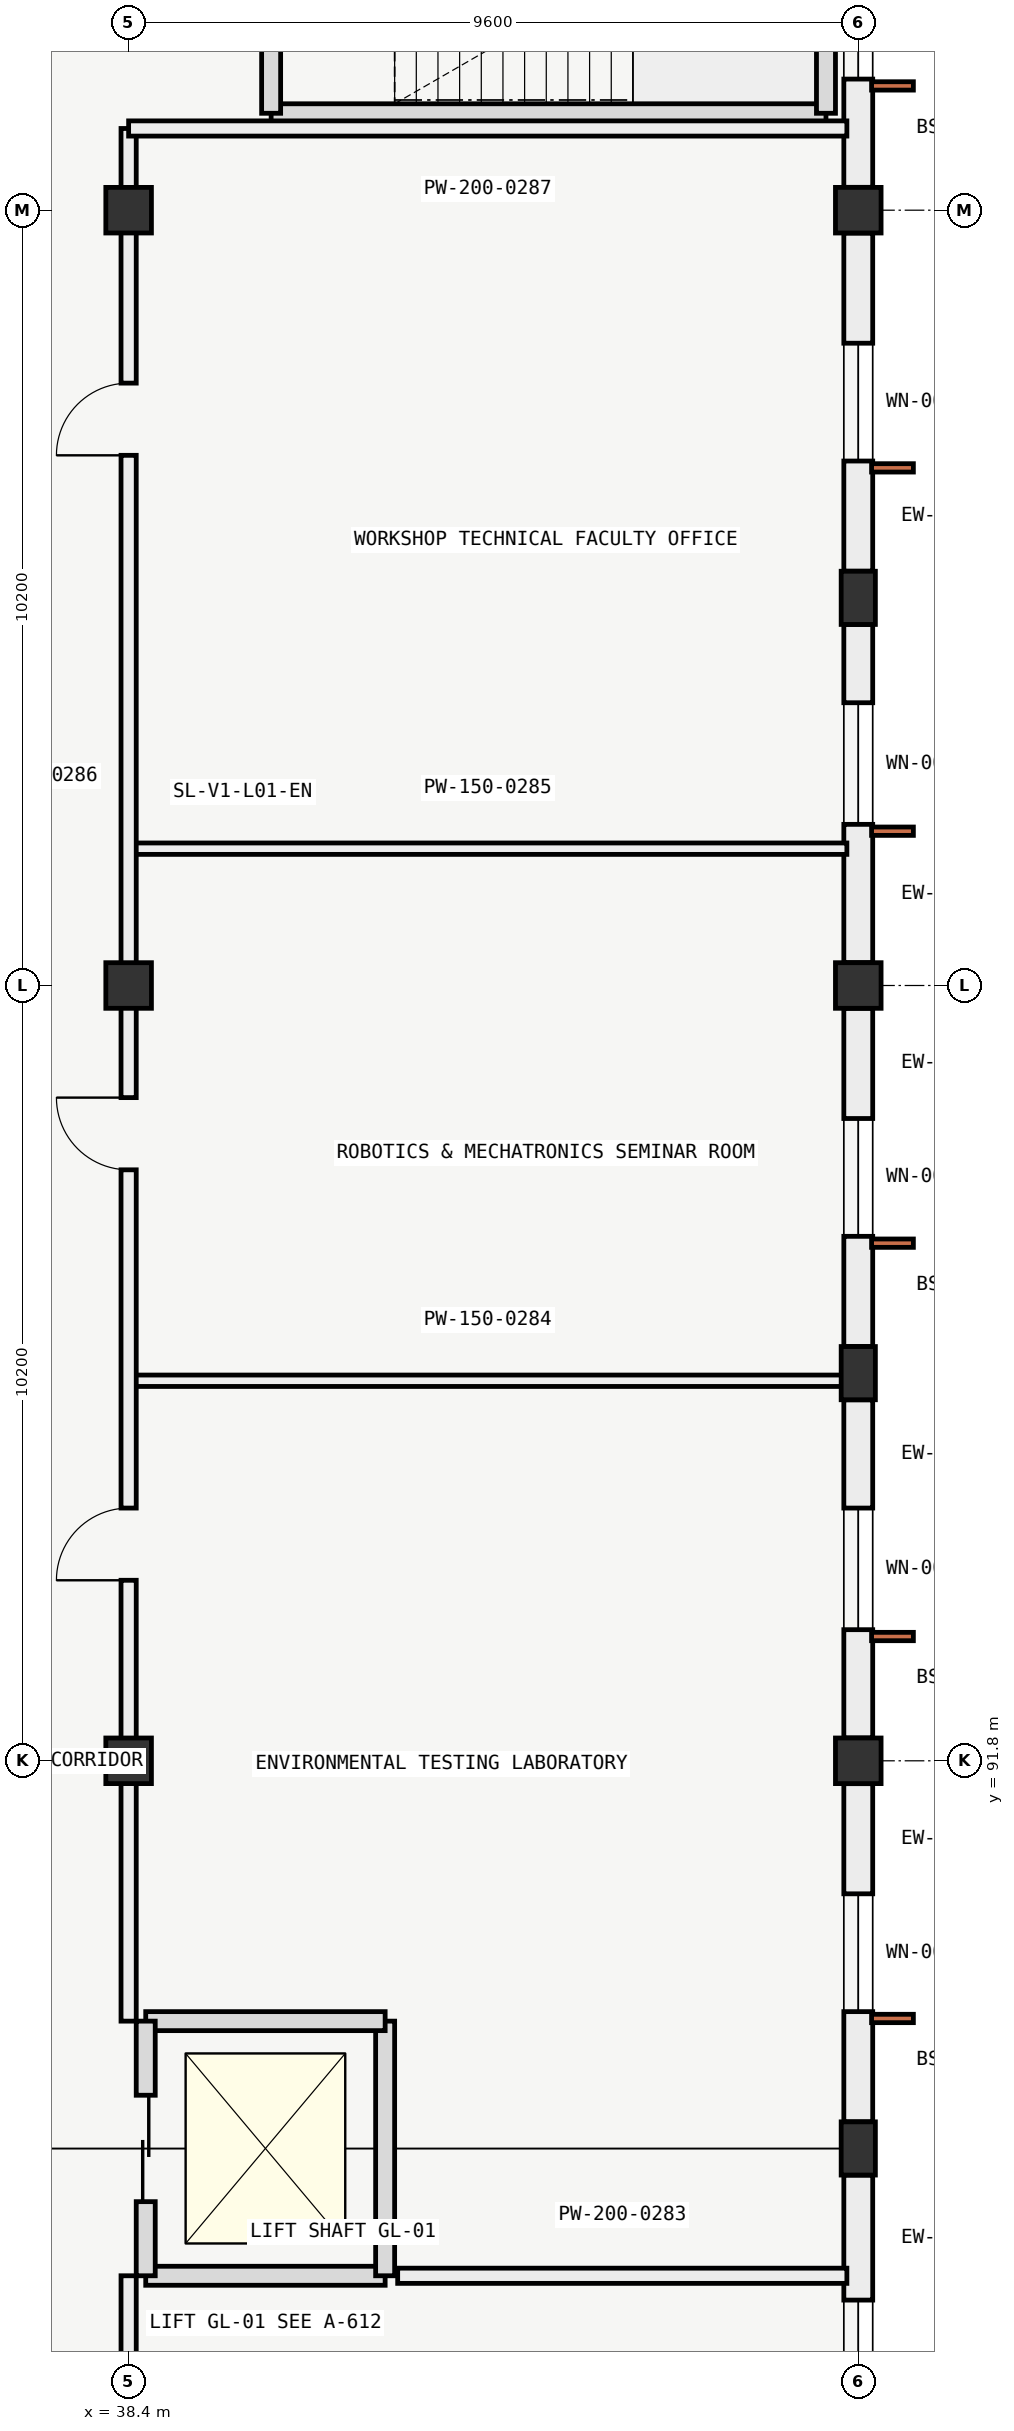
"""IFC4 building model, lengths in metres.
Left out: names, types, materials, properties, quantities, classifications, styles, units other than length and angle.
Written with IfcOpenShell. Run it as: python <this file> out.ifc"""

import sys

from ifc_helpers import new_model, si_unit, direction, frame, frame_2d, origin, origin_2d, place, context, subcontext, project, spatial, rectangle, extrude, element, fill, save


model = new_model("IFC4")
c1 = context("Model", 3, precision=1e-05, world=origin(), true_north=direction((0.0, 1.0)))
c2 = subcontext(c1, "Body", "Model", "MODEL_VIEW")
j1 = project(units=[si_unit("LENGTHUNIT", "METRE"), si_unit("PLANEANGLEUNIT", "RADIAN")], contexts=[c1])
p1 = place(None, origin())
s1 = spatial("IfcSite", under=j1, at=p1, CompositionType="ELEMENT")
p2 = place(p1, origin())
s2 = spatial("IfcBuilding", under=s1, at=p2, CompositionType="ELEMENT")
p3 = place(p2, frame((0.0, 0.0, 5.4)))
s3 = spatial("IfcBuildingStorey", under=s2, at=p3, CompositionType="ELEMENT", Elevation=5.4)
for number, where, z_axis, x_axis in (
    (1, (38.4, 91.8, 0.0), (0.0, 0.0, 1.0), (1.0, 0.0, 0.0)),
    (2, (48.0, 91.8, 0.0), (0.0, 0.0, 1.0), (1.0, 0.0, 0.0)),
    (3, (38.4, 102.0, 0.0), (0.0, 0.0, 1.0), (1.0, 0.0, 0.0)),
    (4, (48.0, 102.0, 0.0), (0.0, 0.0, 1.0), (1.0, 0.0, 0.0)),
    (5, (38.4, 112.2, 0.0), (0.0, 0.0, 1.0), (1.0, 0.0, 0.0)),
    (6, (48.0, 112.2, 0.0), (0.0, 0.0, 1.0), (1.0, 0.0, 0.0)),
):
    element("IfcColumn", number, at=place(p3, frame(where, z_axis=z_axis, x_axis=x_axis)), inside=s3, PredefinedType="COLUMN", context=c2, shape_type="SweptSolid", body=[
        extrude(rectangle(XDim=0.6, YDim=0.6, at=origin_2d()), origin(), (0.0, 0.0, 1.0), 4.2),
    ])
for number, where, z_axis, x_axis in (
    (7, (48.0, 86.7, 0.0), (0.0, 0.0, 1.0), (1.0, 0.0, 0.0)),
    (8, (48.0, 96.9, 0.0), (0.0, 0.0, 1.0), (1.0, 0.0, 0.0)),
    (9, (48.0, 107.1, 0.0), (0.0, 0.0, 1.0), (1.0, 0.0, 0.0)),
):
    element("IfcColumn", number, at=place(p3, frame(where, z_axis=z_axis, x_axis=x_axis)), inside=s3, PredefinedType="PILASTER", context=c2, shape_type="SweptSolid", body=[
        extrude(rectangle(XDim=0.45, YDim=0.7, at=origin_2d()), origin(), (0.0, 0.0, 1.0), 4.2),
    ])
p4 = place(p3, frame((48.0, 86.349, 0.0), z_axis=(0.0, 0.0, 1.0), x_axis=(0.0, -1.0, 0.0)))
e10 = element("IfcWall", 10, at=p4, inside=s3, PredefinedType="SOLIDWALL", context=c2, shape_type="SweptSolid", body=[
    extrude(rectangle(XDim=4.448, YDim=0.38, at=frame_2d((2.224, 0.0))), origin(), (0.0, 0.0, 1.0), 3.25),
])
p5 = place(p4, frame((1.644, 0.0, 0.95)))
e11 = element("IfcOpeningElement", 11, at=p5, cuts=e10, PredefinedType="OPENING", context=c2, shape_type="SweptSolid", body=[
    extrude(rectangle(XDim=1.6, YDim=1.9, at=frame_2d((0.8, 0.95))), frame((0.0, 0.2, 0.0), z_axis=(0.0, -1.0, 0.0), x_axis=(1.0, 0.0, 0.0)), (0.0, 0.0, 1.0), 0.4),
])
p6 = place(p3, frame((48.0, 91.499, 0.0), z_axis=(0.0, 0.0, 1.0), x_axis=(0.0, -1.0, 0.0)))
e12 = element("IfcWall", 12, at=p6, inside=s3, PredefinedType="SOLIDWALL", context=c2, shape_type="SweptSolid", body=[
    extrude(rectangle(XDim=4.448, YDim=0.38, at=frame_2d((2.224, 0.0))), origin(), (0.0, 0.0, 1.0), 3.25),
])
p7 = place(p6, frame((1.449, 0.0, 0.95)))
e13 = element("IfcOpeningElement", 13, at=p7, cuts=e12, PredefinedType="OPENING", context=c2, shape_type="SweptSolid", body=[
    extrude(rectangle(XDim=1.55, YDim=1.85, at=frame_2d((0.775, 0.925))), frame((0.0, 0.2, 0.0), z_axis=(0.0, -1.0, 0.0), x_axis=(1.0, 0.0, 0.0)), (0.0, 0.0, 1.0), 0.4),
])
p8 = place(p3, frame((48.0, 96.549, 0.0), z_axis=(0.0, 0.0, 1.0), x_axis=(0.0, -1.0, 0.0)))
e14 = element("IfcWall", 14, at=p8, inside=s3, PredefinedType="SOLIDWALL", context=c2, shape_type="SweptSolid", body=[
    extrude(rectangle(XDim=4.448, YDim=0.38, at=frame_2d((2.224, 0.0))), origin(), (0.0, 0.0, 1.0), 3.25),
])
p9 = place(p8, frame((1.424, 0.0, 0.95)))
e15 = element("IfcOpeningElement", 15, at=p9, cuts=e14, PredefinedType="OPENING", context=c2, shape_type="SweptSolid", body=[
    extrude(rectangle(XDim=1.6, YDim=1.9, at=frame_2d((0.8, 0.95))), frame((0.0, 0.2, 0.0), z_axis=(0.0, -1.0, 0.0), x_axis=(1.0, 0.0, 0.0)), (0.0, 0.0, 1.0), 0.4),
])
p10 = place(p3, frame((48.0, 101.699, 0.0), z_axis=(0.0, 0.0, 1.0), x_axis=(0.0, -1.0, 0.0)))
e16 = element("IfcWall", 16, at=p10, inside=s3, PredefinedType="SOLIDWALL", context=c2, shape_type="SweptSolid", body=[
    extrude(rectangle(XDim=4.448, YDim=0.38, at=frame_2d((2.224, 0.0))), origin(), (0.0, 0.0, 1.0), 3.25),
])
p11 = place(p10, frame((1.449, 0.0, 0.95)))
e17 = element("IfcOpeningElement", 17, at=p11, cuts=e16, PredefinedType="OPENING", context=c2, shape_type="SweptSolid", body=[
    extrude(rectangle(XDim=1.55, YDim=1.85, at=frame_2d((0.775, 0.925))), frame((0.0, 0.2, 0.0), z_axis=(0.0, -1.0, 0.0), x_axis=(1.0, 0.0, 0.0)), (0.0, 0.0, 1.0), 0.4),
])
p12 = place(p3, frame((48.0, 106.749, 0.0), z_axis=(0.0, 0.0, 1.0), x_axis=(0.0, -1.0, 0.0)))
e18 = element("IfcWall", 18, at=p12, inside=s3, PredefinedType="SOLIDWALL", context=c2, shape_type="SweptSolid", body=[
    extrude(rectangle(XDim=4.448, YDim=0.38, at=frame_2d((2.224, 0.0))), origin(), (0.0, 0.0, 1.0), 3.25),
])
p13 = place(p12, frame((1.029, 0.0, 0.95)))
e19 = element("IfcOpeningElement", 19, at=p13, cuts=e18, PredefinedType="OPENING", context=c2, shape_type="SweptSolid", body=[
    extrude(rectangle(XDim=1.6, YDim=1.9, at=frame_2d((0.8, 0.95))), frame((0.0, 0.2, 0.0), z_axis=(0.0, -1.0, 0.0), x_axis=(1.0, 0.0, 0.0)), (0.0, 0.0, 1.0), 0.4),
])
p14 = place(p3, frame((48.0, 111.899, 0.0), z_axis=(0.0, 0.0, 1.0), x_axis=(0.0, -1.0, 0.0)))
e20 = element("IfcWall", 20, at=p14, inside=s3, PredefinedType="SOLIDWALL", context=c2, shape_type="SweptSolid", body=[
    extrude(rectangle(XDim=4.448, YDim=0.38, at=frame_2d((2.224, 0.0))), origin(), (0.0, 0.0, 1.0), 3.25),
])
p15 = place(p14, frame((1.449, 0.0, 0.95)))
e21 = element("IfcOpeningElement", 21, at=p15, cuts=e20, PredefinedType="OPENING", context=c2, shape_type="SweptSolid", body=[
    extrude(rectangle(XDim=1.55, YDim=1.85, at=frame_2d((0.775, 0.925))), frame((0.0, 0.2, 0.0), z_axis=(0.0, -1.0, 0.0), x_axis=(1.0, 0.0, 0.0)), (0.0, 0.0, 1.0), 0.4),
])
p16 = place(p3, frame((48.0, 116.949, 0.0), z_axis=(0.0, 0.0, 1.0), x_axis=(0.0, -1.0, 0.0)))
e22 = element("IfcWall", 22, at=p16, inside=s3, PredefinedType="SOLIDWALL", context=c2, shape_type="SweptSolid", body=[
    extrude(rectangle(XDim=4.448, YDim=0.38, at=frame_2d((2.224, 0.0))), origin(), (0.0, 0.0, 1.0), 3.25),
])
p17 = place(p16, frame((1.424, 0.0, 0.95)))
e23 = element("IfcOpeningElement", 23, at=p17, cuts=e22, PredefinedType="OPENING", context=c2, shape_type="SweptSolid", body=[
    extrude(rectangle(XDim=1.6, YDim=1.9, at=frame_2d((0.8, 0.95))), frame((0.0, 0.2, 0.0), z_axis=(0.0, -1.0, 0.0), x_axis=(1.0, 0.0, 0.0)), (0.0, 0.0, 1.0), 0.4),
])
p18 = place(p3, frame((40.275, 113.475, 0.0), z_axis=(0.0, 0.0, 1.0), x_axis=(1.0, 0.0, 0.0)))
e24 = element("IfcWall", 24, at=p18, inside=s3, PredefinedType="SOLIDWALL", context=c2, shape_type="SweptSolid", body=[
    extrude(rectangle(XDim=7.3, YDim=0.25, at=frame_2d((3.65, 0.0))), origin(), (0.0, 0.0, 1.0), 3.92),
])
p19 = place(p3, frame((47.575, 113.475, 0.0), z_axis=(0.0, 0.0, 1.0), x_axis=(0.0, 1.0, 0.0)))
e25 = element("IfcWall", 25, at=p19, inside=s3, PredefinedType="SOLIDWALL", context=c2, shape_type="SweptSolid", body=[
    extrude(rectangle(XDim=3.45, YDim=0.25, at=frame_2d((1.725, 0.0))), origin(), (0.0, 0.0, 1.0), 3.92),
])
p20 = place(p3, frame((40.275, 116.925, 0.0), z_axis=(0.0, 0.0, 1.0), x_axis=(0.0, -1.0, 0.0)))
e26 = element("IfcWall", 26, at=p20, inside=s3, PredefinedType="SOLIDWALL", context=c2, shape_type="SweptSolid", body=[
    extrude(rectangle(XDim=3.45, YDim=0.25, at=frame_2d((1.725, 0.0))), origin(), (0.0, 0.0, 1.0), 3.92),
])
p21 = place(p20, frame((1.175, 0.0, 0.0)))
e27 = element("IfcOpeningElement", 27, at=p21, cuts=e26, PredefinedType="OPENING", context=c2, shape_type="SweptSolid", body=[
    extrude(rectangle(XDim=1.1, YDim=2.2, at=frame_2d((0.55, 1.1))), frame((0.0, 0.135, 0.0), z_axis=(0.0, -1.0, 0.0), x_axis=(1.0, 0.0, 0.0)), (0.0, 0.0, 1.0), 0.27),
])
p22 = place(p3, frame((38.625, 85.025, 0.0), z_axis=(0.0, 0.0, 1.0), x_axis=(1.0, 0.0, 0.0)))
e28 = element("IfcWall", 28, at=p22, inside=s3, PredefinedType="SOLIDWALL", context=c2, shape_type="SweptSolid", body=[
    extrude(rectangle(XDim=3.15, YDim=0.25, at=frame_2d((1.575, 0.0))), origin(), (0.0, 0.0, 1.0), 3.92),
])
p23 = place(p3, frame((41.775, 85.025, 0.0), z_axis=(0.0, 0.0, 1.0), x_axis=(0.0, 1.0, 0.0)))
e29 = element("IfcWall", 29, at=p23, inside=s3, PredefinedType="SOLIDWALL", context=c2, shape_type="SweptSolid", body=[
    extrude(rectangle(XDim=3.35, YDim=0.25, at=frame_2d((1.675, 0.0))), origin(), (0.0, 0.0, 1.0), 3.92),
])
p24 = place(p3, frame((41.775, 88.375, 0.0), z_axis=(0.0, 0.0, 1.0), x_axis=(-1.0, 0.0, 0.0)))
e30 = element("IfcWall", 30, at=p24, inside=s3, PredefinedType="SOLIDWALL", context=c2, shape_type="SweptSolid", body=[
    extrude(rectangle(XDim=3.15, YDim=0.25, at=frame_2d((1.575, 0.0))), origin(), (0.0, 0.0, 1.0), 3.92),
])
p25 = place(p3, frame((38.625, 88.375, 0.0), z_axis=(0.0, 0.0, 1.0), x_axis=(0.0, -1.0, 0.0)))
e31 = element("IfcWall", 31, at=p25, inside=s3, PredefinedType="SOLIDWALL", context=c2, shape_type="SweptSolid", body=[
    extrude(rectangle(XDim=3.35, YDim=0.25, at=frame_2d((1.675, 0.0))), origin(), (0.0, 0.0, 1.0), 3.92),
])
p26 = place(p25, frame((0.975, 0.0, 0.0)))
e32 = element("IfcOpeningElement", 32, at=p26, cuts=e31, PredefinedType="OPENING", context=c2, shape_type="SweptSolid", body=[
    extrude(rectangle(XDim=1.4, YDim=2.2, at=frame_2d((0.7, 1.1))), frame((0.0, 0.135, 0.0), z_axis=(0.0, -1.0, 0.0), x_axis=(1.0, 0.0, 0.0)), (0.0, 0.0, 1.0), 0.27),
])
p27 = place(p3, frame((38.4, 58.325, 0.0), z_axis=(0.0, 0.0, 1.0), x_axis=(0.0, 1.0, 0.0)))
e33 = element("IfcWall", 33, at=p27, inside=s3, PredefinedType="PARTITIONING", context=c2, shape_type="SweptSolid", body=[
    extrude(rectangle(XDim=26.7, YDim=0.2, at=frame_2d((13.35, 0.0))), origin(), (0.0, 0.0, 1.0), 3.298),
])
p28 = place(p27, frame((1.35, 0.0, 0.0)))
e34 = element("IfcOpeningElement", 34, at=p28, cuts=e33, PredefinedType="OPENING", context=c2, shape_type="SweptSolid", body=[
    extrude(rectangle(XDim=0.95, YDim=2.1, at=frame_2d((0.475, 1.05))), frame((0.0, 0.11, 0.0), z_axis=(0.0, -1.0, 0.0), x_axis=(1.0, 0.0, 0.0)), (0.0, 0.0, 1.0), 0.22),
])
p29 = place(p27, frame((6.08, 0.0, 0.0)))
e35 = element("IfcOpeningElement", 35, at=p29, cuts=e33, PredefinedType="OPENING", context=c2, shape_type="SweptSolid", body=[
    extrude(rectangle(XDim=0.9, YDim=2.05, at=frame_2d((0.45, 1.025))), frame((0.0, 0.11, 0.0), z_axis=(0.0, -1.0, 0.0), x_axis=(1.0, 0.0, 0.0)), (0.0, 0.0, 1.0), 0.22),
])
p30 = place(p27, frame((10.6, 0.0, 0.0)))
e36 = element("IfcOpeningElement", 36, at=p30, cuts=e33, PredefinedType="OPENING", context=c2, shape_type="SweptSolid", body=[
    extrude(rectangle(XDim=0.95, YDim=2.1, at=frame_2d((0.475, 1.05))), frame((0.0, 0.11, 0.0), z_axis=(0.0, -1.0, 0.0), x_axis=(1.0, 0.0, 0.0)), (0.0, 0.0, 1.0), 0.22),
])
p31 = place(p27, frame((20.3, 0.0, 0.0)))
e37 = element("IfcOpeningElement", 37, at=p31, cuts=e33, PredefinedType="OPENING", context=c2, shape_type="SweptSolid", body=[
    extrude(rectangle(XDim=0.95, YDim=2.1, at=frame_2d((0.475, 1.05))), frame((0.0, 0.11, 0.0), z_axis=(0.0, -1.0, 0.0), x_axis=(1.0, 0.0, 0.0)), (0.0, 0.0, 1.0), 0.22),
])
p32 = place(p3, frame((41.94, 85.025, 0.0), z_axis=(0.0, 0.0, 1.0), x_axis=(1.0, 0.0, 0.0)))
e38 = element("IfcWall", 38, at=p32, inside=s3, PredefinedType="PARTITIONING", context=c2, shape_type="SweptSolid", body=[
    extrude(rectangle(XDim=5.91, YDim=0.2, at=frame_2d((2.955, 0.0))), origin(), (0.0, 0.0, 1.0), 3.85),
])
for number, where, z_axis, x_axis in (
    (39, (38.4, 96.8, 0.0), (0.0, 0.0, 1.0), (1.0, 0.0, 0.0)),
    (40, (38.4, 103.8, 0.0), (0.0, 0.0, 1.0), (1.0, 0.0, 0.0)),
):
    element("IfcWall", number, at=place(p3, frame(where, z_axis=z_axis, x_axis=x_axis)), inside=s3, PredefinedType="PARTITIONING", context=c2, shape_type="SweptSolid", body=[
        extrude(rectangle(XDim=9.45, YDim=0.15, at=frame_2d((4.725, 0.0))), origin(), (0.0, 0.0, 1.0), 3.443),
    ])
p33 = place(p3, frame((38.4, 88.375, 0.0), z_axis=(0.0, 0.0, 1.0), x_axis=(0.0, 1.0, 0.0)))
e41 = element("IfcWall", 41, at=p33, inside=s3, PredefinedType="PARTITIONING", context=c2, shape_type="SweptSolid", body=[
    extrude(rectangle(XDim=24.9, YDim=0.2, at=frame_2d((12.45, 0.0))), origin(), (0.0, 0.0, 1.0), 3.298),
])
p34 = place(p33, frame((5.8, 0.0, 0.0)))
e42 = element("IfcOpeningElement", 42, at=p34, cuts=e41, PredefinedType="OPENING", context=c2, shape_type="SweptSolid", body=[
    extrude(rectangle(XDim=0.95, YDim=2.1, at=frame_2d((0.475, 1.05))), frame((0.0, 0.11, 0.0), z_axis=(0.0, -1.0, 0.0), x_axis=(1.0, 0.0, 0.0)), (0.0, 0.0, 1.0), 0.22),
])
p35 = place(p33, frame((11.2, 0.0, 0.0)))
e43 = element("IfcOpeningElement", 43, at=p35, cuts=e41, PredefinedType="OPENING", context=c2, shape_type="SweptSolid", body=[
    extrude(rectangle(XDim=0.95, YDim=2.1, at=frame_2d((0.475, 1.05))), frame((0.0, 0.11, 0.0), z_axis=(0.0, -1.0, 0.0), x_axis=(1.0, 0.0, 0.0)), (0.0, 0.0, 1.0), 0.22),
])
p36 = place(p33, frame((20.6, 0.0, 0.0)))
e44 = element("IfcOpeningElement", 44, at=p36, cuts=e41, PredefinedType="OPENING", context=c2, shape_type="SweptSolid", body=[
    extrude(rectangle(XDim=0.95, YDim=2.1, at=frame_2d((0.475, 1.05))), frame((0.0, 0.11, 0.0), z_axis=(0.0, -1.0, 0.0), x_axis=(1.0, 0.0, 0.0)), (0.0, 0.0, 1.0), 0.22),
])
p37 = place(p3, frame((38.4, 113.275, 0.0), z_axis=(0.0, 0.0, 1.0), x_axis=(1.0, 0.0, 0.0)))
e45 = element("IfcWall", 45, at=p37, inside=s3, PredefinedType="PARTITIONING", context=c2, shape_type="SweptSolid", body=[
    extrude(rectangle(XDim=9.45, YDim=0.2, at=frame_2d((4.725, 0.0))), origin(), (0.0, 0.0, 1.0), 3.443),
])
p38 = place(p5, origin())
e46 = element("IfcWindow", 46, at=p38, inside=s3, PartitioningType="SINGLE_PANEL", PredefinedType="WINDOW", context=c2, shape_type="SweptSolid", body=[
    extrude(rectangle(XDim=1.6, YDim=1.9, at=frame_2d((0.8, 0.95))), frame((0.0, 0.03, 0.0), z_axis=(0.0, -1.0, 0.0), x_axis=(1.0, 0.0, 0.0)), (0.0, 0.0, 1.0), 0.06),
])
fill(e11, e46)
p39 = place(p7, origin())
e47 = element("IfcWindow", 47, at=p39, inside=s3, PartitioningType="SINGLE_PANEL", PredefinedType="WINDOW", context=c2, shape_type="SweptSolid", body=[
    extrude(rectangle(XDim=1.55, YDim=1.85, at=frame_2d((0.775, 0.925))), frame((0.0, 0.03, 0.0), z_axis=(0.0, -1.0, 0.0), x_axis=(1.0, 0.0, 0.0)), (0.0, 0.0, 1.0), 0.06),
])
fill(e13, e47)
p40 = place(p9, origin())
e48 = element("IfcWindow", 48, at=p40, inside=s3, PartitioningType="SINGLE_PANEL", PredefinedType="WINDOW", context=c2, shape_type="SweptSolid", body=[
    extrude(rectangle(XDim=1.6, YDim=1.9, at=frame_2d((0.8, 0.95))), frame((0.0, 0.03, 0.0), z_axis=(0.0, -1.0, 0.0), x_axis=(1.0, 0.0, 0.0)), (0.0, 0.0, 1.0), 0.06),
])
fill(e15, e48)
p41 = place(p11, origin())
e49 = element("IfcWindow", 49, at=p41, inside=s3, PartitioningType="SINGLE_PANEL", PredefinedType="WINDOW", context=c2, shape_type="SweptSolid", body=[
    extrude(rectangle(XDim=1.55, YDim=1.85, at=frame_2d((0.775, 0.925))), frame((0.0, 0.03, 0.0), z_axis=(0.0, -1.0, 0.0), x_axis=(1.0, 0.0, 0.0)), (0.0, 0.0, 1.0), 0.06),
])
fill(e17, e49)
p42 = place(p13, origin())
e50 = element("IfcWindow", 50, at=p42, inside=s3, PartitioningType="SINGLE_PANEL", PredefinedType="WINDOW", context=c2, shape_type="SweptSolid", body=[
    extrude(rectangle(XDim=1.6, YDim=1.9, at=frame_2d((0.8, 0.95))), frame((0.0, 0.03, 0.0), z_axis=(0.0, -1.0, 0.0), x_axis=(1.0, 0.0, 0.0)), (0.0, 0.0, 1.0), 0.06),
])
fill(e19, e50)
p43 = place(p15, origin())
e51 = element("IfcWindow", 51, at=p43, inside=s3, PartitioningType="SINGLE_PANEL", PredefinedType="WINDOW", context=c2, shape_type="SweptSolid", body=[
    extrude(rectangle(XDim=1.55, YDim=1.85, at=frame_2d((0.775, 0.925))), frame((0.0, 0.03, 0.0), z_axis=(0.0, -1.0, 0.0), x_axis=(1.0, 0.0, 0.0)), (0.0, 0.0, 1.0), 0.06),
])
fill(e21, e51)
p44 = place(p17, origin())
e52 = element("IfcWindow", 52, at=p44, inside=s3, PartitioningType="SINGLE_PANEL", PredefinedType="WINDOW", context=c2, shape_type="SweptSolid", body=[
    extrude(rectangle(XDim=1.6, YDim=1.9, at=frame_2d((0.8, 0.95))), frame((0.0, 0.03, 0.0), z_axis=(0.0, -1.0, 0.0), x_axis=(1.0, 0.0, 0.0)), (0.0, 0.0, 1.0), 0.06),
])
fill(e23, e52)
p45 = place(p26, origin())
e53 = element("IfcDoor", 53, at=p45, inside=s3, OperationType="DOUBLE_DOOR_SLIDING", PredefinedType="DOOR", context=c2, shape_type="SweptSolid", body=[
    extrude(rectangle(XDim=1.4, YDim=2.2, at=frame_2d((0.7, 1.1))), frame((0.0, 0.025, 0.0), z_axis=(0.0, -1.0, 0.0), x_axis=(1.0, 0.0, 0.0)), (0.0, 0.0, 1.0), 0.05),
])
fill(e32, e53)
p46 = place(p34, origin())
e54 = element("IfcDoor", 54, at=p46, inside=s3, OperationType="SINGLE_SWING_LEFT", PredefinedType="DOOR", context=c2, shape_type="SweptSolid", body=[
    extrude(rectangle(XDim=0.95, YDim=2.1, at=frame_2d((0.475, 1.05))), frame((0.0, 0.025, 0.0), z_axis=(0.0, -1.0, 0.0), x_axis=(1.0, 0.0, 0.0)), (0.0, 0.0, 1.0), 0.05),
])
fill(e42, e54)
p47 = place(p35, origin())
e55 = element("IfcDoor", 55, at=p47, inside=s3, OperationType="SINGLE_SWING_RIGHT", PredefinedType="DOOR", context=c2, shape_type="SweptSolid", body=[
    extrude(rectangle(XDim=0.95, YDim=2.1, at=frame_2d((0.475, 1.05))), frame((0.0, 0.025, 0.0), z_axis=(0.0, -1.0, 0.0), x_axis=(1.0, 0.0, 0.0)), (0.0, 0.0, 1.0), 0.05),
])
fill(e43, e55)
p48 = place(p36, origin())
e56 = element("IfcDoor", 56, at=p48, inside=s3, OperationType="SINGLE_SWING_LEFT", PredefinedType="DOOR", context=c2, shape_type="SweptSolid", body=[
    extrude(rectangle(XDim=0.95, YDim=2.1, at=frame_2d((0.475, 1.05))), frame((0.0, 0.025, 0.0), z_axis=(0.0, -1.0, 0.0), x_axis=(1.0, 0.0, 0.0)), (0.0, 0.0, 1.0), 0.05),
])
fill(e44, e56)
save(model, sys.argv[1])
